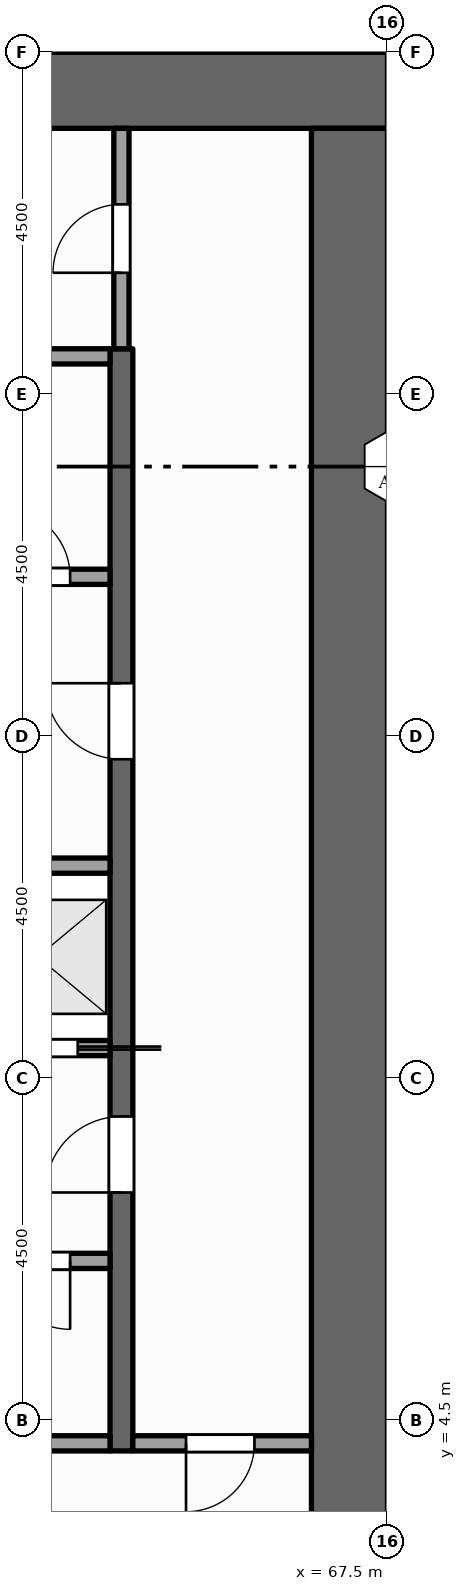
"""IFC4 building model, lengths in metres.
Left out: names, types, materials, properties, quantities, classifications, styles, units other than length and angle.
Written with IfcOpenShell. Run it as: python <this file> out.ifc"""

import sys

from ifc_helpers import new_model, si_unit, direction, frame, frame_2d, origin, place, context, subcontext, project, spatial, rectangle, extrude, element, fill, save


model = new_model("IFC4")
c1 = context("Model", 3, precision=1e-05, world=origin(), true_north=direction((0.0, 1.0)))
c2 = subcontext(c1, "Body", "Model", "MODEL_VIEW")
j1 = project(units=[si_unit("LENGTHUNIT", "METRE"), si_unit("PLANEANGLEUNIT", "RADIAN")], contexts=[c1])
p1 = place(None, origin())
s1 = spatial("IfcSite", under=j1, at=p1, CompositionType="ELEMENT")
p2 = place(p1, origin())
s2 = spatial("IfcBuilding", under=s1, at=p2, CompositionType="ELEMENT")
p3 = place(p2, frame((0.0, 0.0, 235.0)))
s3 = spatial("IfcBuildingStorey", under=s2, at=p3, CompositionType="ELEMENT", Elevation=235.0)
p4 = place(p3, frame((54.0, 22.0, -0.15), z_axis=(0.0, 0.0, 1.0), x_axis=(1.0, 0.0, 0.0)))
e1 = element("IfcWall", 1, at=p4, inside=s3, PredefinedType="SHEAR", context=c2, shape_type="SweptSolid", body=[
    extrude(rectangle(XDim=13.5, YDim=1.0, at=frame_2d((6.75, 0.0))), origin(), (0.0, 0.0, 1.0), 4.0),
])
p5 = place(p3, frame((67.0, 1.0, -0.15), z_axis=(0.0, 0.0, 1.0), x_axis=(0.0, 1.0, 0.0)))
e2 = element("IfcWall", 2, at=p5, inside=s3, PredefinedType="SHEAR", context=c2, shape_type="SweptSolid", body=[
    extrude(rectangle(XDim=20.5, YDim=1.0, at=frame_2d((10.25, 0.0))), origin(), (0.0, 0.0, 1.0), 4.0),
])
p6 = place(p3, frame((64.0, 4.1, 0.0), z_axis=(0.0, 0.0, 1.0), x_axis=(0.0, 1.0, 0.0)))
e3 = element("IfcWall", 3, at=p6, inside=s3, PredefinedType="SHEAR", context=c2, shape_type="SweptSolid", body=[
    extrude(rectangle(XDim=14.5, YDim=0.3, at=frame_2d((7.25, 0.0))), origin(), (0.0, 0.0, 1.0), 3.85),
])
p7 = place(p6, frame((3.4, 0.0, 0.0)))
e4 = element("IfcOpeningElement", 4, at=p7, cuts=e3, PredefinedType="OPENING", context=c2, shape_type="SweptSolid", body=[
    extrude(rectangle(XDim=1.0, YDim=2.1, at=frame_2d((0.5, 1.05))), frame((0.0, 0.16, 0.0), z_axis=(0.0, -1.0, 0.0), x_axis=(1.0, 0.0, 0.0)), (0.0, 0.0, 1.0), 0.32),
])
p8 = place(p6, frame((9.1, 0.0, 0.0)))
e5 = element("IfcOpeningElement", 5, at=p8, cuts=e3, PredefinedType="OPENING", context=c2, shape_type="SweptSolid", body=[
    extrude(rectangle(XDim=1.0, YDim=2.1, at=frame_2d((0.5, 1.05))), frame((0.0, 0.16, 0.0), z_axis=(0.0, -1.0, 0.0), x_axis=(1.0, 0.0, 0.0)), (0.0, 0.0, 1.0), 0.32),
])
p9 = place(p3, frame((64.0, 18.6, 0.0), z_axis=(0.0, 0.0, 1.0), x_axis=(0.0, 1.0, 0.0)))
e6 = element("IfcWall", 6, at=p9, inside=s3, PredefinedType="PARTITIONING", context=c2, shape_type="SweptSolid", body=[
    extrude(rectangle(XDim=2.9, YDim=0.2, at=frame_2d((1.45, 0.0))), origin(), (0.0, 0.0, 1.0), 3.85),
])
p10 = place(p9, frame((1.0, 0.0, 0.0)))
e7 = element("IfcOpeningElement", 7, at=p10, cuts=e6, PredefinedType="OPENING", context=c2, shape_type="SweptSolid", body=[
    extrude(rectangle(XDim=0.9, YDim=2.1, at=frame_2d((0.45, 1.05))), frame((0.0, 0.11, 0.0), z_axis=(0.0, -1.0, 0.0), x_axis=(1.0, 0.0, 0.0)), (0.0, 0.0, 1.0), 0.22),
])
p11 = place(p3, frame((61.9, 4.2, 0.0), z_axis=(0.0, 0.0, 1.0), x_axis=(1.0, 0.0, 0.0)))
e8 = element("IfcWall", 8, at=p11, inside=s3, PredefinedType="PARTITIONING", context=c2, shape_type="SweptSolid", body=[
    extrude(rectangle(XDim=1.95, YDim=0.2, at=frame_2d((0.975, 0.0))), origin(), (0.0, 0.0, 1.0), 3.85),
])
p12 = place(p3, frame((64.15, 4.2, 0.0), z_axis=(0.0, 0.0, 1.0), x_axis=(1.0, 0.0, 0.0)))
e9 = element("IfcWall", 9, at=p12, inside=s3, PredefinedType="PARTITIONING", context=c2, shape_type="SweptSolid", body=[
    extrude(rectangle(XDim=2.35, YDim=0.2, at=frame_2d((1.175, 0.0))), origin(), (0.0, 0.0, 1.0), 3.85),
])
p13 = place(p12, frame((0.7, 0.0, 0.0)))
e10 = element("IfcOpeningElement", 10, at=p13, cuts=e9, PredefinedType="OPENING", context=c2, shape_type="SweptSolid", body=[
    extrude(rectangle(XDim=0.9, YDim=2.1, at=frame_2d((0.45, 1.05))), frame((0.0, 0.11, 0.0), z_axis=(0.0, -1.0, 0.0), x_axis=(1.0, 0.0, 0.0)), (0.0, 0.0, 1.0), 0.22),
])
p14 = place(p3, frame((61.9, 6.6, 0.0), z_axis=(0.0, 0.0, 1.0), x_axis=(1.0, 0.0, 0.0)))
e11 = element("IfcWall", 11, at=p14, inside=s3, PredefinedType="PARTITIONING", context=c2, shape_type="SweptSolid", body=[
    extrude(rectangle(XDim=1.95, YDim=0.2, at=frame_2d((0.975, 0.0))), origin(), (0.0, 0.0, 1.0), 3.85),
])
p15 = place(p14, frame((0.525, 0.0, 0.0)))
e12 = element("IfcOpeningElement", 12, at=p15, cuts=e11, PredefinedType="OPENING", context=c2, shape_type="SweptSolid", body=[
    extrude(rectangle(XDim=0.9, YDim=2.1, at=frame_2d((0.45, 1.05))), frame((0.0, 0.11, 0.0), z_axis=(0.0, -1.0, 0.0), x_axis=(1.0, 0.0, 0.0)), (0.0, 0.0, 1.0), 0.22),
])
p16 = place(p3, frame((61.9, 9.4, 0.0), z_axis=(0.0, 0.0, 1.0), x_axis=(1.0, 0.0, 0.0)))
e13 = element("IfcWall", 13, at=p16, inside=s3, PredefinedType="SOLIDWALL", context=c2, shape_type="SweptSolid", body=[
    extrude(rectangle(XDim=1.95, YDim=0.2, at=frame_2d((0.975, 0.0))), origin(), (0.0, 0.0, 1.0), 3.85),
])
p17 = place(p16, frame((0.425, 0.0, 0.012)))
e14 = element("IfcOpeningElement", 14, at=p17, cuts=e13, PredefinedType="OPENING", context=c2, shape_type="SweptSolid", body=[
    extrude(rectangle(XDim=1.1, YDim=2.1, at=frame_2d((0.55, 1.05))), frame((0.0, 0.11, 0.0), z_axis=(0.0, -1.0, 0.0), x_axis=(1.0, 0.0, 0.0)), (0.0, 0.0, 1.0), 0.22),
])
p18 = place(p3, frame((61.9, 11.8, 0.0), z_axis=(0.0, 0.0, 1.0), x_axis=(1.0, 0.0, 0.0)))
e15 = element("IfcWall", 15, at=p18, inside=s3, PredefinedType="SOLIDWALL", context=c2, shape_type="SweptSolid", body=[
    extrude(rectangle(XDim=1.95, YDim=0.2, at=frame_2d((0.975, 0.0))), origin(), (0.0, 0.0, 1.0), 3.85),
])
p19 = place(p3, frame((61.9, 15.6, 0.0), z_axis=(0.0, 0.0, 1.0), x_axis=(1.0, 0.0, 0.0)))
e16 = element("IfcWall", 16, at=p19, inside=s3, PredefinedType="PARTITIONING", context=c2, shape_type="SweptSolid", body=[
    extrude(rectangle(XDim=1.95, YDim=0.2, at=frame_2d((0.975, 0.0))), origin(), (0.0, 0.0, 1.0), 3.85),
])
p20 = place(p19, frame((0.525, 0.0, 0.0)))
e17 = element("IfcOpeningElement", 17, at=p20, cuts=e16, PredefinedType="OPENING", context=c2, shape_type="SweptSolid", body=[
    extrude(rectangle(XDim=0.9, YDim=2.1, at=frame_2d((0.45, 1.05))), frame((0.0, 0.11, 0.0), z_axis=(0.0, -1.0, 0.0), x_axis=(1.0, 0.0, 0.0)), (0.0, 0.0, 1.0), 0.22),
])
p21 = place(p3, frame((61.9, 18.5, 0.0), z_axis=(0.0, 0.0, 1.0), x_axis=(1.0, 0.0, 0.0)))
e18 = element("IfcWall", 18, at=p21, inside=s3, PredefinedType="PARTITIONING", context=c2, shape_type="SweptSolid", body=[
    extrude(rectangle(XDim=1.95, YDim=0.2, at=frame_2d((0.975, 0.0))), origin(), (0.0, 0.0, 1.0), 3.85),
])
p22 = place(p17, origin())
e19 = element("IfcDoor", 19, at=p22, inside=s3, OperationType="SLIDING_TO_RIGHT", PredefinedType="DOOR", context=c2, shape_type="SweptSolid", body=[
    extrude(rectangle(XDim=1.1, YDim=2.1, at=frame_2d((0.55, 1.05))), frame((0.0, 0.025, 0.0), z_axis=(0.0, -1.0, 0.0), x_axis=(1.0, 0.0, 0.0)), (0.0, 0.0, 1.0), 0.05),
])
fill(e14, e19)
p23 = place(p7, origin())
e20 = element("IfcDoor", 20, at=p23, inside=s3, OperationType="SINGLE_SWING_LEFT", PredefinedType="DOOR", context=c2, shape_type="SweptSolid", body=[
    extrude(rectangle(XDim=1.0, YDim=2.1, at=frame_2d((0.5, 1.05))), frame((0.0, 0.025, 0.0), z_axis=(0.0, -1.0, 0.0), x_axis=(1.0, 0.0, 0.0)), (0.0, 0.0, 1.0), 0.05),
])
fill(e4, e20)
p24 = place(p8, origin())
e21 = element("IfcDoor", 21, at=p24, inside=s3, OperationType="SINGLE_SWING_RIGHT", PredefinedType="DOOR", context=c2, shape_type="SweptSolid", body=[
    extrude(rectangle(XDim=1.0, YDim=2.1, at=frame_2d((0.5, 1.05))), frame((0.0, 0.025, 0.0), z_axis=(0.0, -1.0, 0.0), x_axis=(1.0, 0.0, 0.0)), (0.0, 0.0, 1.0), 0.05),
])
fill(e5, e21)
p25 = place(p13, origin())
e22 = element("IfcDoor", 22, at=p25, inside=s3, OperationType="SINGLE_SWING_LEFT", PredefinedType="DOOR", context=c2, shape_type="SweptSolid", body=[
    extrude(rectangle(XDim=0.9, YDim=2.1, at=frame_2d((0.45, 1.05))), frame((0.0, 0.025, 0.0), z_axis=(0.0, -1.0, 0.0), x_axis=(1.0, 0.0, 0.0)), (0.0, 0.0, 1.0), 0.05),
])
fill(e10, e22)
p26 = place(p10, origin())
e23 = element("IfcDoor", 23, at=p26, inside=s3, OperationType="SINGLE_SWING_LEFT", PredefinedType="DOOR", context=c2, shape_type="SweptSolid", body=[
    extrude(rectangle(XDim=0.9, YDim=2.1, at=frame_2d((0.45, 1.05))), frame((0.0, 0.025, 0.0), z_axis=(0.0, -1.0, 0.0), x_axis=(1.0, 0.0, 0.0)), (0.0, 0.0, 1.0), 0.05),
])
fill(e7, e23)
p27 = place(p15, origin())
e24 = element("IfcDoor", 24, at=p27, inside=s3, OperationType="SINGLE_SWING_RIGHT", PredefinedType="DOOR", context=c2, shape_type="SweptSolid", body=[
    extrude(rectangle(XDim=0.9, YDim=2.1, at=frame_2d((0.45, 1.05))), frame((0.0, 0.025, 0.0), z_axis=(0.0, -1.0, 0.0), x_axis=(1.0, 0.0, 0.0)), (0.0, 0.0, 1.0), 0.05),
])
fill(e12, e24)
p28 = place(p20, origin())
e25 = element("IfcDoor", 25, at=p28, inside=s3, OperationType="SINGLE_SWING_LEFT", PredefinedType="DOOR", context=c2, shape_type="SweptSolid", body=[
    extrude(rectangle(XDim=0.9, YDim=2.1, at=frame_2d((0.45, 1.05))), frame((0.0, 0.025, 0.0), z_axis=(0.0, -1.0, 0.0), x_axis=(1.0, 0.0, 0.0)), (0.0, 0.0, 1.0), 0.05),
])
fill(e17, e25)
save(model, sys.argv[1])
